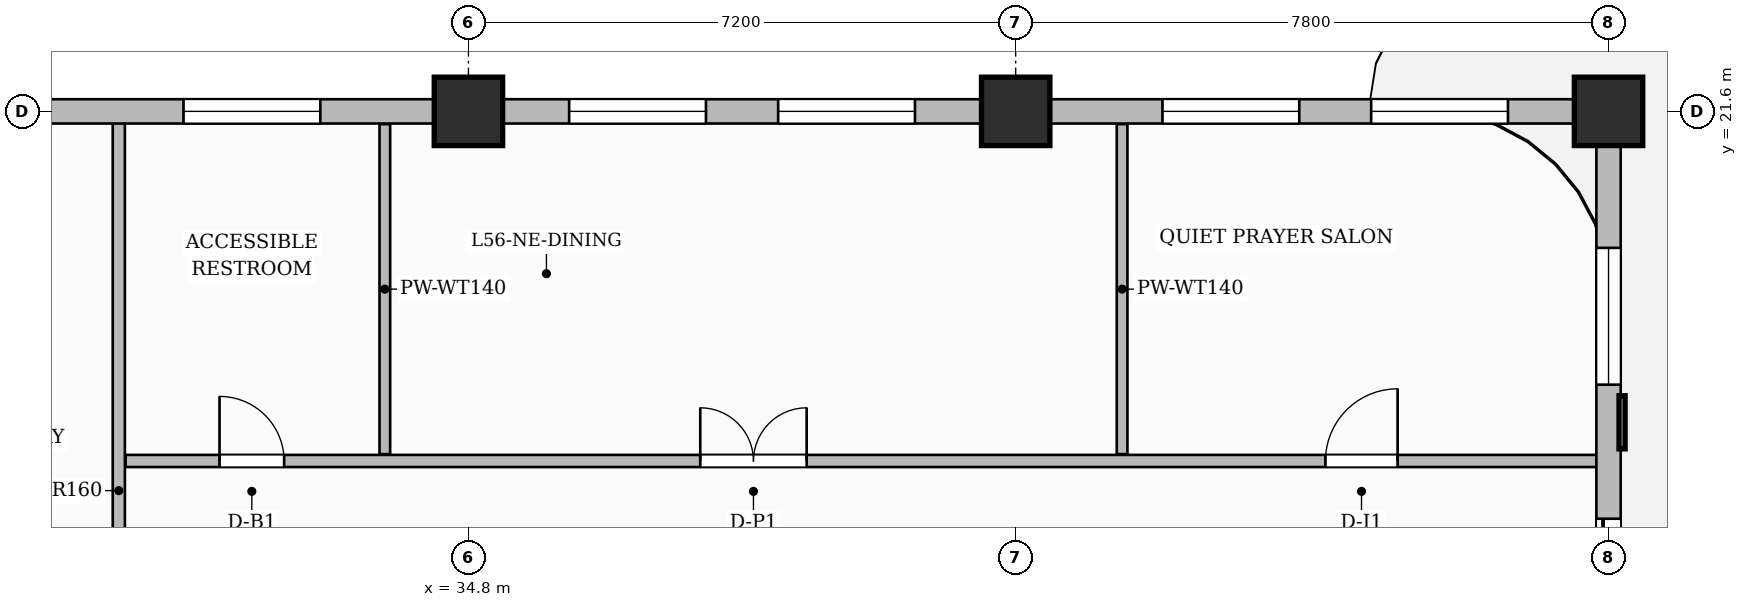
"""IFC4 building model, lengths in metres.
Left out: names, types, materials, properties, quantities, classifications, styles, units other than length and angle.
Written with IfcOpenShell. Run it as: python <this file> out.ifc"""

import sys

from ifc_helpers import new_model, si_unit, direction, frame, frame_2d, origin, origin_2d, place, context, subcontext, project, spatial, rectangle, extrude, source, transform, mapped, element, fill, save


model = new_model("IFC4")
c1 = context("Model", 3, precision=1e-05, world=origin(), true_north=direction((0.0, 1.0)))
c2 = subcontext(c1, "Body", "Model", "MODEL_VIEW")
j1 = project(units=[si_unit("LENGTHUNIT", "METRE"), si_unit("PLANEANGLEUNIT", "RADIAN")], contexts=[c1])
p1 = place(None, origin())
s1 = spatial("IfcSite", under=j1, at=p1, CompositionType="ELEMENT")
p2 = place(p1, origin())
s2 = spatial("IfcBuilding", under=s1, at=p2, CompositionType="ELEMENT")
p3 = place(p2, frame((0.0, 0.0, 225.0)))
s3 = spatial("IfcBuildingStorey", under=s2, at=p3, CompositionType="ELEMENT", Elevation=225.0)
m1 = source(origin(), c2, "Body", "SweptSolid", [
    extrude(rectangle(XDim=0.9, YDim=0.9, at=origin_2d()), origin(), (0.0, 0.0, 1.0), 3.85),
])
for number, where, z_axis, x_axis in (
    (1, (34.8, 21.6, 0.0), (0.0, 0.0, 1.0), (1.0, 0.0, 0.0)),
    (2, (42.0, 21.6, 0.0), (0.0, 0.0, 1.0), (1.0, 0.0, 0.0)),
    (3, (49.8, 21.6, 0.0), (0.0, 0.0, 1.0), (1.0, 0.0, 0.0)),
):
    element("IfcColumn", number, at=place(p3, frame(where, z_axis=z_axis, x_axis=x_axis)), inside=s3, PredefinedType="COLUMN", context=c2, shape_type="MappedRepresentation", body=[
        mapped(m1, transform((0.0, 0.0, 0.0), scale=1.0)),
    ])
p4 = place(p3, frame((30.2, 11.76, 0.0), z_axis=(0.0, 0.0, 1.0), x_axis=(0.0, 1.0, 0.0)))
e4 = element("IfcWall", 4, at=p4, inside=s3, PredefinedType="PARTITIONING", context=c2, shape_type="SweptSolid", body=[
    extrude(rectangle(XDim=9.7, YDim=0.16, at=frame_2d((4.85, 0.0))), origin(), (0.0, 0.0, 1.0), 3.6),
])
p5 = place(p3, frame((30.29, 17.0, 0.0), z_axis=(0.0, 0.0, 1.0), x_axis=(1.0, 0.0, 0.0)))
e5 = element("IfcWall", 5, at=p5, inside=s3, PredefinedType="PARTITIONING", context=c2, shape_type="SweptSolid", body=[
    extrude(rectangle(XDim=19.37, YDim=0.16, at=frame_2d((9.685, 0.0))), origin(), (0.0, 0.0, 1.0), 3.6),
])
p6 = place(p5, frame((1.235, 0.0, 0.0)))
e6 = element("IfcOpeningElement", 6, at=p6, cuts=e5, PredefinedType="OPENING", context=c2, shape_type="SweptSolid", body=[
    extrude(rectangle(XDim=0.85, YDim=2.1, at=frame_2d((0.425, 1.05))), frame((0.0, 0.09, 0.0), z_axis=(0.0, -1.0, 0.0), x_axis=(1.0, 0.0, 0.0)), (0.0, 0.0, 1.0), 0.18),
])
p7 = place(p5, frame((7.56, 0.0, 0.0)))
e7 = element("IfcOpeningElement", 7, at=p7, cuts=e5, PredefinedType="OPENING", context=c2, shape_type="SweptSolid", body=[
    extrude(rectangle(XDim=1.4, YDim=2.35, at=frame_2d((0.7, 1.175))), frame((0.0, 0.09, 0.0), z_axis=(0.0, -1.0, 0.0), x_axis=(1.0, 0.0, 0.0)), (0.0, 0.0, 1.0), 0.18),
])
p8 = place(p5, frame((15.785, 0.0, 0.0)))
e8 = element("IfcOpeningElement", 8, at=p8, cuts=e5, PredefinedType="OPENING", context=c2, shape_type="SweptSolid", body=[
    extrude(rectangle(XDim=0.95, YDim=2.15, at=frame_2d((0.475, 1.075))), frame((0.0, 0.09, 0.0), z_axis=(0.0, -1.0, 0.0), x_axis=(1.0, 0.0, 0.0)), (0.0, 0.0, 1.0), 0.18),
])
for number, where, z_axis, x_axis in (
    (9, (33.7, 17.09, 0.0), (0.0, 0.0, 1.0), (0.0, 1.0, 0.0)),
    (10, (43.4, 17.09, 0.0), (0.0, 0.0, 1.0), (0.0, 1.0, 0.0)),
):
    element("IfcWall", number, at=place(p3, frame(where, z_axis=z_axis, x_axis=x_axis)), inside=s3, PredefinedType="PARTITIONING", context=c2, shape_type="SweptSolid", body=[
        extrude(rectangle(XDim=4.342, YDim=0.14, at=frame_2d((2.171, 0.0))), origin(), (0.0, 0.0, 1.0), 3.6),
    ])
p9 = place(p3, frame((49.8, 14.62, 0.0), z_axis=(0.0, 0.0, 1.0), x_axis=(0.0, 1.0, 0.0)))
e11 = element("IfcWall", 11, at=p9, inside=s3, PredefinedType="SOLIDWALL", context=c2, shape_type="SweptSolid", body=[
    extrude(rectangle(XDim=6.93, YDim=0.32, at=frame_2d((3.465, 0.0))), origin(), (0.0, 0.0, 1.0), 3.135),
])
p10 = place(p9, frame((0.42, 0.0, 0.0)))
e12 = element("IfcOpeningElement", 12, at=p10, cuts=e11, PredefinedType="OPENING", context=c2, shape_type="SweptSolid", body=[
    extrude(rectangle(XDim=1.2, YDim=2.2, at=frame_2d((0.6, 1.1))), frame((0.0, 0.17, 0.0), z_axis=(0.0, -1.0, 0.0), x_axis=(1.0, 0.0, 0.0)), (0.0, 0.0, 1.0), 0.34),
])
p11 = place(p9, frame((3.384, 0.0, 0.8)))
e13 = element("IfcOpeningElement", 13, at=p11, cuts=e11, PredefinedType="OPENING", context=c2, shape_type="SweptSolid", body=[
    extrude(rectangle(XDim=1.8, YDim=1.85, at=frame_2d((0.9, 0.925))), frame((0.0, 0.17, 0.0), z_axis=(0.0, -1.0, 0.0), x_axis=(1.0, 0.0, 0.0)), (0.0, 0.0, 1.0), 0.34),
])
p12 = place(p3, frame((14.4, 21.6, 0.0), z_axis=(0.0, 0.0, 1.0), x_axis=(1.0, 0.0, 0.0)))
e14 = element("IfcWall", 14, at=p12, inside=s3, PredefinedType="SOLIDWALL", context=c2, shape_type="SweptSolid", body=[
    extrude(rectangle(XDim=35.4, YDim=0.32, at=frame_2d((17.7, 0.0))), origin(), (0.0, 0.0, 1.0), 3.135),
])
p13 = place(p12, frame((0.85, 0.0, 0.0)))
e15 = element("IfcOpeningElement", 15, at=p13, cuts=e14, PredefinedType="OPENING", context=c2, shape_type="SweptSolid", body=[
    extrude(rectangle(XDim=1.2, YDim=2.2, at=frame_2d((0.6, 1.1))), frame((0.0, 0.17, 0.0), z_axis=(0.0, -1.0, 0.0), x_axis=(1.0, 0.0, 0.0)), (0.0, 0.0, 1.0), 0.34),
])
p14 = place(p12, frame((2.811, 0.0, 0.8)))
e16 = element("IfcOpeningElement", 16, at=p14, cuts=e14, PredefinedType="OPENING", context=c2, shape_type="SweptSolid", body=[
    extrude(rectangle(XDim=1.8, YDim=1.85, at=frame_2d((0.9, 0.925))), frame((0.0, 0.17, 0.0), z_axis=(0.0, -1.0, 0.0), x_axis=(1.0, 0.0, 0.0)), (0.0, 0.0, 1.0), 0.34),
])
p15 = place(p12, frame((5.269, 0.0, 0.8)))
e17 = element("IfcOpeningElement", 17, at=p15, cuts=e14, PredefinedType="OPENING", context=c2, shape_type="SweptSolid", body=[
    extrude(rectangle(XDim=0.95, YDim=1.75, at=frame_2d((0.475, 0.875))), frame((0.0, 0.17, 0.0), z_axis=(0.0, -1.0, 0.0), x_axis=(1.0, 0.0, 0.0)), (0.0, 0.0, 1.0), 0.34),
])
p16 = place(p12, frame((8.696, 0.0, 0.8)))
e18 = element("IfcOpeningElement", 18, at=p16, cuts=e14, PredefinedType="OPENING", context=c2, shape_type="SweptSolid", body=[
    extrude(rectangle(XDim=1.8, YDim=1.85, at=frame_2d((0.9, 0.925))), frame((0.0, 0.17, 0.0), z_axis=(0.0, -1.0, 0.0), x_axis=(1.0, 0.0, 0.0)), (0.0, 0.0, 1.0), 0.34),
])
p17 = place(p12, frame((11.704, 0.0, 0.8)))
e19 = element("IfcOpeningElement", 19, at=p17, cuts=e14, PredefinedType="OPENING", context=c2, shape_type="SweptSolid", body=[
    extrude(rectangle(XDim=1.4, YDim=1.85, at=frame_2d((0.7, 0.925))), frame((0.0, 0.17, 0.0), z_axis=(0.0, -1.0, 0.0), x_axis=(1.0, 0.0, 0.0)), (0.0, 0.0, 1.0), 0.34),
])
p18 = place(p12, frame((16.651, 0.0, 0.8)))
e20 = element("IfcOpeningElement", 20, at=p18, cuts=e14, PredefinedType="OPENING", context=c2, shape_type="SweptSolid", body=[
    extrude(rectangle(XDim=1.8, YDim=1.85, at=frame_2d((0.9, 0.925))), frame((0.0, 0.17, 0.0), z_axis=(0.0, -1.0, 0.0), x_axis=(1.0, 0.0, 0.0)), (0.0, 0.0, 1.0), 0.34),
])
p19 = place(p12, frame((21.725, 0.0, 0.8)))
e21 = element("IfcOpeningElement", 21, at=p19, cuts=e14, PredefinedType="OPENING", context=c2, shape_type="SweptSolid", body=[
    extrude(rectangle(XDim=1.8, YDim=1.85, at=frame_2d((0.9, 0.925))), frame((0.0, 0.17, 0.0), z_axis=(0.0, -1.0, 0.0), x_axis=(1.0, 0.0, 0.0)), (0.0, 0.0, 1.0), 0.34),
])
p20 = place(p12, frame((24.475, 0.0, 0.8)))
e22 = element("IfcOpeningElement", 22, at=p20, cuts=e14, PredefinedType="OPENING", context=c2, shape_type="SweptSolid", body=[
    extrude(rectangle(XDim=1.8, YDim=1.85, at=frame_2d((0.9, 0.925))), frame((0.0, 0.17, 0.0), z_axis=(0.0, -1.0, 0.0), x_axis=(1.0, 0.0, 0.0)), (0.0, 0.0, 1.0), 0.34),
])
p21 = place(p12, frame((29.531, 0.0, 0.8)))
e23 = element("IfcOpeningElement", 23, at=p21, cuts=e14, PredefinedType="OPENING", context=c2, shape_type="SweptSolid", body=[
    extrude(rectangle(XDim=1.8, YDim=1.85, at=frame_2d((0.9, 0.925))), frame((0.0, 0.17, 0.0), z_axis=(0.0, -1.0, 0.0), x_axis=(1.0, 0.0, 0.0)), (0.0, 0.0, 1.0), 0.34),
])
p22 = place(p12, frame((32.277, 0.0, 0.8)))
e24 = element("IfcOpeningElement", 24, at=p22, cuts=e14, PredefinedType="OPENING", context=c2, shape_type="SweptSolid", body=[
    extrude(rectangle(XDim=1.8, YDim=1.85, at=frame_2d((0.9, 0.925))), frame((0.0, 0.17, 0.0), z_axis=(0.0, -1.0, 0.0), x_axis=(1.0, 0.0, 0.0)), (0.0, 0.0, 1.0), 0.34),
])
m2 = source(origin(), c2, "Body", "SweptSolid", [
    extrude(rectangle(XDim=0.85, YDim=2.1, at=frame_2d((0.425, 1.05))), frame((0.0, 0.025, 0.0), z_axis=(0.0, -1.0, 0.0), x_axis=(1.0, 0.0, 0.0)), (0.0, 0.0, 1.0), 0.05),
])
p23 = place(p6, origin())
e25 = element("IfcDoor", 25, at=p23, inside=s3, OperationType="SINGLE_SWING_LEFT", PredefinedType="DOOR", context=c2, shape_type="MappedRepresentation", body=[
    mapped(m2, transform((0.0, 0.0, 0.0), scale=1.0)),
])
fill(e6, e25)
m3 = source(origin(), c2, "Body", "SweptSolid", [
    extrude(rectangle(XDim=1.4, YDim=2.35, at=frame_2d((0.7, 1.175))), frame((0.0, 0.025, 0.0), z_axis=(0.0, -1.0, 0.0), x_axis=(1.0, 0.0, 0.0)), (0.0, 0.0, 1.0), 0.05),
])
p24 = place(p7, origin())
e26 = element("IfcDoor", 26, at=p24, inside=s3, OperationType="DOUBLE_DOOR_SINGLE_SWING", PredefinedType="DOOR", context=c2, shape_type="MappedRepresentation", body=[
    mapped(m3, transform((0.0, 0.0, 0.0), scale=1.0)),
])
fill(e7, e26)
m4 = source(origin(), c2, "Body", "SweptSolid", [
    extrude(rectangle(XDim=0.95, YDim=2.15, at=frame_2d((0.475, 1.075))), frame((0.0, 0.025, 0.0), z_axis=(0.0, -1.0, 0.0), x_axis=(1.0, 0.0, 0.0)), (0.0, 0.0, 1.0), 0.05),
])
p25 = place(p8, origin())
e27 = element("IfcDoor", 27, at=p25, inside=s3, OperationType="SINGLE_SWING_RIGHT", PredefinedType="DOOR", context=c2, shape_type="MappedRepresentation", body=[
    mapped(m4, transform((0.0, 0.0, 0.0), scale=1.0)),
])
fill(e8, e27)
m5 = source(origin(), c2, "Body", "SweptSolid", [
    extrude(rectangle(XDim=1.2, YDim=2.2, at=frame_2d((0.6, 1.1))), frame((0.0, 0.025, 0.0), z_axis=(0.0, -1.0, 0.0), x_axis=(1.0, 0.0, 0.0)), (0.0, 0.0, 1.0), 0.05),
])
p26 = place(p10, origin())
e28 = element("IfcDoor", 28, at=p26, inside=s3, OperationType="SLIDING_TO_LEFT", PredefinedType="DOOR", context=c2, shape_type="MappedRepresentation", body=[
    mapped(m5, transform((0.0, 0.0, 0.0), scale=1.0)),
])
fill(e12, e28)
m6 = source(origin(), c2, "Body", "SweptSolid", [
    extrude(rectangle(XDim=1.8, YDim=1.85, at=frame_2d((0.9, 0.925))), frame((0.0, 0.03, 0.0), z_axis=(0.0, -1.0, 0.0), x_axis=(1.0, 0.0, 0.0)), (0.0, 0.0, 1.0), 0.06),
])
p27 = place(p11, origin())
e29 = element("IfcWindow", 29, at=p27, inside=s3, PartitioningType="DOUBLE_PANEL_VERTICAL", PredefinedType="WINDOW", context=c2, shape_type="MappedRepresentation", body=[
    mapped(m6, transform((0.0, 0.0, 0.0), scale=1.0)),
])
fill(e13, e29)
p28 = place(p18, origin())
e30 = element("IfcWindow", 30, at=p28, inside=s3, PartitioningType="DOUBLE_PANEL_VERTICAL", PredefinedType="WINDOW", context=c2, shape_type="MappedRepresentation", body=[
    mapped(m6, transform((0.0, 0.0, 0.0), scale=1.0)),
])
fill(e20, e30)
p29 = place(p19, origin())
e31 = element("IfcWindow", 31, at=p29, inside=s3, PartitioningType="DOUBLE_PANEL_VERTICAL", PredefinedType="WINDOW", context=c2, shape_type="MappedRepresentation", body=[
    mapped(m6, transform((0.0, 0.0, 0.0), scale=1.0)),
])
fill(e21, e31)
p30 = place(p20, origin())
e32 = element("IfcWindow", 32, at=p30, inside=s3, PartitioningType="DOUBLE_PANEL_VERTICAL", PredefinedType="WINDOW", context=c2, shape_type="MappedRepresentation", body=[
    mapped(m6, transform((0.0, 0.0, 0.0), scale=1.0)),
])
fill(e22, e32)
p31 = place(p21, origin())
e33 = element("IfcWindow", 33, at=p31, inside=s3, PartitioningType="DOUBLE_PANEL_VERTICAL", PredefinedType="WINDOW", context=c2, shape_type="MappedRepresentation", body=[
    mapped(m6, transform((0.0, 0.0, 0.0), scale=1.0)),
])
fill(e23, e33)
p32 = place(p22, origin())
e34 = element("IfcWindow", 34, at=p32, inside=s3, PartitioningType="DOUBLE_PANEL_VERTICAL", PredefinedType="WINDOW", context=c2, shape_type="MappedRepresentation", body=[
    mapped(m6, transform((0.0, 0.0, 0.0), scale=1.0)),
])
fill(e24, e34)
save(model, sys.argv[1])
